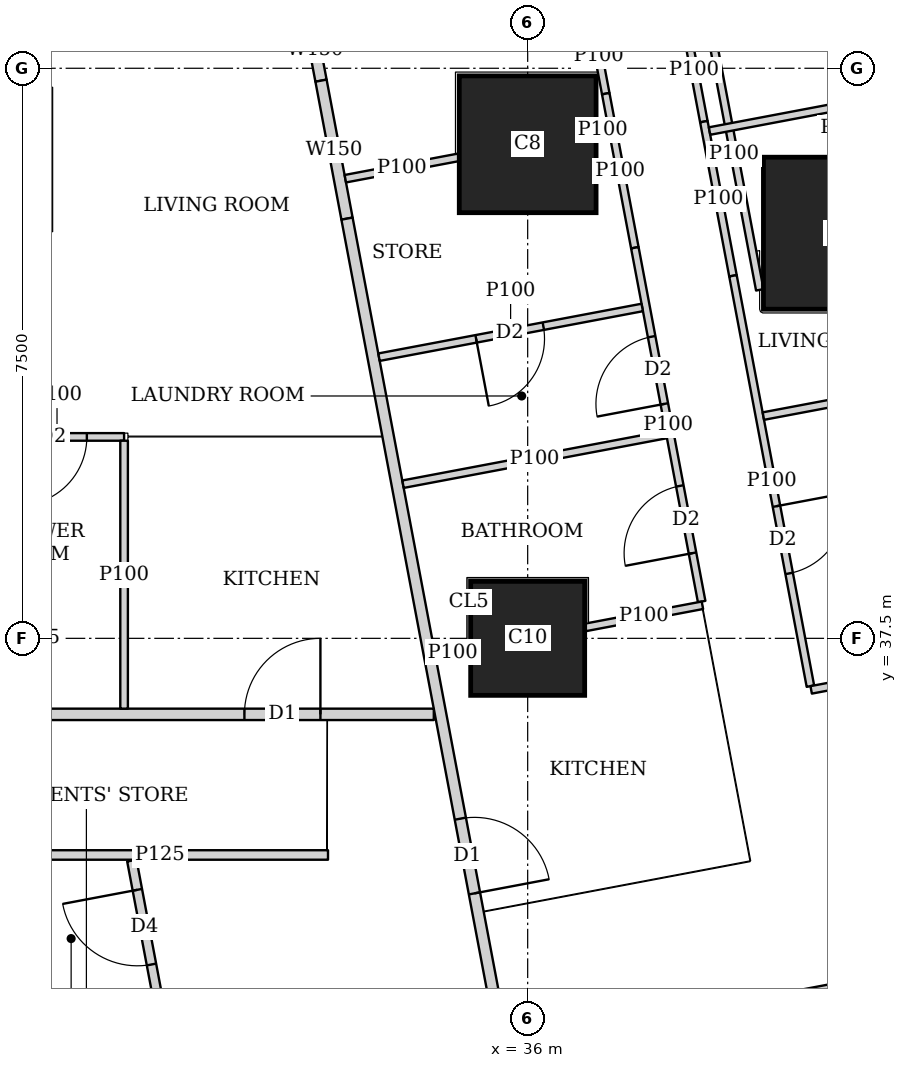
"""IFC4 building model, lengths in metres.
Left out: names, types, materials, properties, quantities, classifications, styles, units other than length and angle.
Written with IfcOpenShell. Run it as: python <this file> out.ifc"""

import sys

from ifc_helpers import new_model, si_unit, direction, frame, frame_2d, origin, origin_2d, place, context, subcontext, project, spatial, rectangle, extrude, element, fill, save


model = new_model("IFC4")
c1 = context("Model", 3, precision=1e-05, world=origin(), true_north=direction((0.0, 1.0)))
c2 = subcontext(c1, "Body", "Model", "MODEL_VIEW")
j1 = project(units=[si_unit("LENGTHUNIT", "METRE"), si_unit("PLANEANGLEUNIT", "RADIAN")], contexts=[c1])
p1 = place(None, origin())
s1 = spatial("IfcSite", under=j1, at=p1, CompositionType="ELEMENT")
p2 = place(p1, origin())
s2 = spatial("IfcBuilding", under=s1, at=p2, CompositionType="ELEMENT")
p3 = place(p2, frame((0.0, 0.0, 184.55)))
s3 = spatial("IfcBuildingStorey", under=s2, at=p3, CompositionType="ELEMENT", Elevation=184.55)
p4 = place(p3, frame((36.0, 37.5, 0.0), z_axis=(0.0, 0.0, 1.0), x_axis=(1.0, 0.0, 0.0)))
e1 = element("IfcColumn", 1, at=p4, inside=s3, PredefinedType="COLUMN", context=c2, shape_type="SweptSolid", body=[
    extrude(rectangle(XDim=1.5, YDim=1.5, at=origin_2d()), origin(), (0.0, 0.0, 1.0), 3.75),
])
p5 = place(p3, frame((40.102, 42.83, 0.0), z_axis=(0.0, 0.0, 1.0), x_axis=(1.0, 0.0, 0.0)))
e2 = element("IfcColumn", 2, at=p5, inside=s3, PredefinedType="COLUMN", context=c2, shape_type="SweptSolid", body=[
    extrude(rectangle(XDim=2.0, YDim=2.0, at=origin_2d()), origin(), (0.0, 0.0, 1.0), 3.75),
])
p6 = place(p3, frame((36.0, 44.0, 0.0), z_axis=(0.0, 0.0, 1.0), x_axis=(1.0, 0.0, 0.0)))
e3 = element("IfcColumn", 3, at=p6, inside=s3, PredefinedType="COLUMN", context=c2, shape_type="SweptSolid", body=[
    extrude(rectangle(XDim=1.8, YDim=1.8, at=origin_2d()), origin(), (0.0, 0.0, 1.0), 3.75),
])
p7 = place(p3, frame((8.35, 36.5, 0.0), z_axis=(0.0, 0.0, 1.0), x_axis=(1.0, 0.0, 0.0)))
e4 = element("IfcWall", 4, at=p7, inside=s3, PredefinedType="SOLIDWALL", context=c2, shape_type="SweptSolid", body=[
    extrude(rectangle(XDim=26.415, YDim=0.15, at=frame_2d((13.208, 0.0))), origin(), (0.0, 0.0, 1.0), 3.45),
])
p8 = place(p7, frame((2.6, 0.0, 0.0)))
e5 = element("IfcOpeningElement", 5, at=p8, cuts=e4, PredefinedType="OPENING", context=c2, shape_type="SweptSolid", body=[
    extrude(rectangle(XDim=1.0, YDim=2.1, at=frame_2d((0.5, 1.05))), frame((0.0, 0.085, 0.0), z_axis=(0.0, -1.0, 0.0), x_axis=(1.0, 0.0, 0.0)), (0.0, 0.0, 1.0), 0.17),
])
p9 = place(p7, frame((14.75, 0.0, 0.0)))
e6 = element("IfcOpeningElement", 6, at=p9, cuts=e4, PredefinedType="OPENING", context=c2, shape_type="SweptSolid", body=[
    extrude(rectangle(XDim=1.0, YDim=2.1, at=frame_2d((0.5, 1.05))), frame((0.0, 0.085, 0.0), z_axis=(0.0, -1.0, 0.0), x_axis=(1.0, 0.0, 0.0)), (0.0, 0.0, 1.0), 0.17),
])
p10 = place(p7, frame((23.923, 0.0, 0.0)))
e7 = element("IfcOpeningElement", 7, at=p10, cuts=e4, PredefinedType="OPENING", context=c2, shape_type="SweptSolid", body=[
    extrude(rectangle(XDim=1.0, YDim=2.1, at=frame_2d((0.5, 1.05))), frame((0.0, 0.085, 0.0), z_axis=(0.0, -1.0, 0.0), x_axis=(1.0, 0.0, 0.0)), (0.0, 0.0, 1.0), 0.17),
])
p11 = place(p3, frame((33.127, 45.65, 0.0), z_axis=(0.0, 0.0, 1.0), x_axis=(0.186176514576, -0.982516313056, 0.0)))
e8 = element("IfcWall", 8, at=p11, inside=s3, PredefinedType="SOLIDWALL", context=c2, shape_type="SweptSolid", body=[
    extrude(rectangle(XDim=0.827, YDim=0.15, at=frame_2d((0.414, 0.0))), origin(), (0.0, 0.0, 1.0), 3.45),
])
p12 = place(p3, frame((33.281, 44.837, 0.0), z_axis=(0.0, 0.0, 1.0), x_axis=(0.185198323004, -0.982701165745, 0.0)))
e9 = element("IfcWall", 9, at=p12, inside=s3, PredefinedType="SOLIDWALL", context=c2, shape_type="SweptSolid", body=[
    extrude(rectangle(XDim=1.847, YDim=0.15, at=frame_2d((0.923, 0.0))), origin(), (0.0, 0.0, 1.0), 2.05),
])
p13 = place(p3, frame((33.623, 43.022, 0.0), z_axis=(0.0, 0.0, 1.0), x_axis=(0.185596841028, -0.98262597798, 0.0)))
e10 = element("IfcWall", 10, at=p13, inside=s3, PredefinedType="SOLIDWALL", context=c2, shape_type="SweptSolid", body=[
    extrude(rectangle(XDim=41.66, YDim=0.15, at=frame_2d((20.83, 0.0))), origin(), (0.0, 0.0, 1.0), 2.45),
])
p14 = place(p13, frame((8.034, 0.0, 0.0)))
e11 = element("IfcOpeningElement", 11, at=p14, cuts=e10, PredefinedType="OPENING", context=c2, shape_type="SweptSolid", body=[
    extrude(rectangle(XDim=1.0, YDim=2.1, at=frame_2d((0.5, 1.05))), frame((0.0, 0.085, 0.0), z_axis=(0.0, -1.0, 0.0), x_axis=(1.0, 0.0, 0.0)), (0.0, 0.0, 1.0), 0.17),
])
p15 = place(p13, frame((12.611, 0.0, 0.0)))
e12 = element("IfcOpeningElement", 12, at=p15, cuts=e10, PredefinedType="OPENING", context=c2, shape_type="SweptSolid", body=[
    extrude(rectangle(XDim=1.0, YDim=2.1, at=frame_2d((0.5, 1.05))), frame((0.0, 0.085, 0.0), z_axis=(0.0, -1.0, 0.0), x_axis=(1.0, 0.0, 0.0)), (0.0, 0.0, 1.0), 0.17),
])
p16 = place(p13, frame((20.242, 0.0, 0.0)))
e13 = element("IfcOpeningElement", 13, at=p16, cuts=e10, PredefinedType="OPENING", context=c2, shape_type="SweptSolid", body=[
    extrude(rectangle(XDim=1.0, YDim=2.1, at=frame_2d((0.5, 1.05))), frame((0.0, 0.085, 0.0), z_axis=(0.0, -1.0, 0.0), x_axis=(1.0, 0.0, 0.0)), (0.0, 0.0, 1.0), 0.17),
])
p17 = place(p13, frame((31.206, 0.0, 0.0)))
e14 = element("IfcOpeningElement", 14, at=p17, cuts=e10, PredefinedType="OPENING", context=c2, shape_type="SweptSolid", body=[
    extrude(rectangle(XDim=1.0, YDim=2.1, at=frame_2d((0.5, 1.05))), frame((0.0, 0.085, 0.0), z_axis=(0.0, -1.0, 0.0), x_axis=(1.0, 0.0, 0.0)), (0.0, 0.0, 1.0), 0.17),
])
p18 = place(p3, frame((39.054, 42.085, 0.0), z_axis=(0.0, 0.0, 1.0), x_axis=(-0.185791584218, 0.982589175207, 0.0)))
e15 = element("IfcWall", 15, at=p18, inside=s3, PredefinedType="PARTITIONING", context=c2, shape_type="SweptSolid", body=[
    extrude(rectangle(XDim=3.628, YDim=0.1, at=frame_2d((1.814, 0.0))), origin(), (0.0, 0.0, 1.0), 2.05),
])
p19 = place(p3, frame((38.063, 45.65, 0.0), z_axis=(0.0, 0.0, 1.0), x_axis=(0.185456359766, -0.982652501458, 0.0)))
e16 = element("IfcWall", 16, at=p19, inside=s3, PredefinedType="PARTITIONING", context=c2, shape_type="SweptSolid", body=[
    extrude(rectangle(XDim=1.376, YDim=0.1, at=frame_2d((0.688, 0.0))), origin(), (0.0, 0.0, 1.0), 3.45),
])
p20 = place(p3, frame((38.318, 44.298, 0.0), z_axis=(0.0, 0.0, 1.0), x_axis=(0.185481135188, -0.982647825261, 0.0)))
e17 = element("IfcWall", 17, at=p20, inside=s3, PredefinedType="PARTITIONING", context=c2, shape_type="SweptSolid", body=[
    extrude(rectangle(XDim=2.064, YDim=0.1, at=frame_2d((1.032, 0.0))), origin(), (0.0, 0.0, 1.0), 2.05),
])
p21 = place(p3, frame((38.701, 42.27, 0.0), z_axis=(0.0, 0.0, 1.0), x_axis=(0.185474244877, -0.982649125826, 0.0)))
e18 = element("IfcWall", 18, at=p21, inside=s3, PredefinedType="PARTITIONING", context=c2, shape_type="SweptSolid", body=[
    extrude(rectangle(XDim=5.494, YDim=0.1, at=frame_2d((2.747, 0.0))), origin(), (0.0, 0.0, 1.0), 3.45),
])
p22 = place(p21, frame((3.085, 0.0, 0.0)))
e19 = element("IfcOpeningElement", 19, at=p22, cuts=e18, PredefinedType="OPENING", context=c2, shape_type="SweptSolid", body=[
    extrude(rectangle(XDim=0.9, YDim=2.1, at=frame_2d((0.45, 1.05))), frame((0.0, 0.06, 0.0), z_axis=(0.0, -1.0, 0.0), x_axis=(1.0, 0.0, 0.0)), (0.0, 0.0, 1.0), 0.12),
])
p23 = place(p3, frame((36.841, 45.65, 0.0), z_axis=(0.0, 0.0, 1.0), x_axis=(0.185789875365, -0.982589498322, 0.0)))
e20 = element("IfcWall", 20, at=p23, inside=s3, PredefinedType="PARTITIONING", context=c2, shape_type="SweptSolid", body=[
    extrude(rectangle(XDim=1.001, YDim=0.1, at=frame_2d((0.5, 0.0))), origin(), (0.0, 0.0, 1.0), 3.45),
])
p24 = place(p3, frame((37.027, 44.666, 0.0), z_axis=(0.0, 0.0, 1.0), x_axis=(0.1855674151, -0.982631535446, 0.0)))
e21 = element("IfcWall", 21, at=p24, inside=s3, PredefinedType="PARTITIONING", context=c2, shape_type="SweptSolid", body=[
    extrude(rectangle(XDim=2.063, YDim=0.1, at=frame_2d((1.031, 0.0))), origin(), (0.0, 0.0, 1.0), 2.05),
])
p25 = place(p3, frame((37.41, 42.639, 0.0), z_axis=(0.0, 0.0, 1.0), x_axis=(0.185579683022, -0.982629218601, 0.0)))
e22 = element("IfcWall", 22, at=p25, inside=s3, PredefinedType="PARTITIONING", context=c2, shape_type="SweptSolid", body=[
    extrude(rectangle(XDim=4.737, YDim=0.1, at=frame_2d((2.369, 0.0))), origin(), (0.0, 0.0, 1.0), 3.45),
])
p26 = place(p25, frame((3.189, 0.0, 0.0)))
e23 = element("IfcOpeningElement", 23, at=p26, cuts=e22, PredefinedType="OPENING", context=c2, shape_type="SweptSolid", body=[
    extrude(rectangle(XDim=0.9, YDim=2.1, at=frame_2d((0.45, 1.05))), frame((0.0, 0.06, 0.0), z_axis=(0.0, -1.0, 0.0), x_axis=(1.0, 0.0, 0.0)), (0.0, 0.0, 1.0), 0.12),
])
p27 = place(p25, frame((1.191, 0.0, 0.0)))
e24 = element("IfcOpeningElement", 24, at=p27, cuts=e22, PredefinedType="OPENING", context=c2, shape_type="SweptSolid", body=[
    extrude(rectangle(XDim=0.9, YDim=2.1, at=frame_2d((0.45, 1.05))), frame((0.0, 0.06, 0.0), z_axis=(0.0, -1.0, 0.0), x_axis=(1.0, 0.0, 0.0)), (0.0, 0.0, 1.0), 0.12),
])
p28 = place(p3, frame((41.968, 44.85, 0.0), z_axis=(0.0, 0.0, 1.0), x_axis=(-0.98258614234, -0.185807623311, 0.0)))
e25 = element("IfcWall", 25, at=p28, inside=s3, PredefinedType="PARTITIONING", context=c2, shape_type="SweptSolid", body=[
    extrude(rectangle(XDim=3.638, YDim=0.1, at=frame_2d((1.819, 0.0))), origin(), (0.0, 0.0, 1.0), 2.05),
])
p29 = place(p3, frame((43.277, 41.212, 0.0), z_axis=(0.0, 0.0, 1.0), x_axis=(-0.982665405803, -0.185387972203, 0.0)))
e26 = element("IfcWall", 26, at=p29, inside=s3, PredefinedType="PARTITIONING", context=c2, shape_type="SweptSolid", body=[
    extrude(rectangle(XDim=4.25, YDim=0.1, at=frame_2d((2.125, 0.0))), origin(), (0.0, 0.0, 1.0), 2.05),
])
p30 = place(p3, frame((41.154, 37.091, 0.0), z_axis=(0.0, 0.0, 1.0), x_axis=(-0.982617614942, -0.185641112921, 0.0)))
e27 = element("IfcWall", 27, at=p30, inside=s3, PredefinedType="PARTITIONING", context=c2, shape_type="SweptSolid", body=[
    extrude(rectangle(XDim=1.449, YDim=0.1, at=frame_2d((0.725, 0.0))), origin(), (0.0, 0.0, 1.0), 3.45),
])
p31 = place(p3, frame((37.064, 44.201, 0.0), z_axis=(0.0, 0.0, 1.0), x_axis=(-0.982960250751, -0.183818240236, 0.0)))
e28 = element("IfcWall", 28, at=p31, inside=s3, PredefinedType="PARTITIONING", context=c2, shape_type="SweptSolid", body=[
    extrude(rectangle(XDim=0.157, YDim=0.1, at=frame_2d((0.078, 0.0))), origin(), (0.0, 0.0, 1.0), 2.05),
])
p32 = place(p3, frame((35.09, 43.828, 0.0), z_axis=(0.0, 0.0, 1.0), x_axis=(-0.982683801717, -0.185290436461, 0.0)))
e29 = element("IfcWall", 29, at=p32, inside=s3, PredefinedType="PARTITIONING", context=c2, shape_type="SweptSolid", body=[
    extrude(rectangle(XDim=1.515, YDim=0.1, at=frame_2d((0.758, 0.0))), origin(), (0.0, 0.0, 1.0), 2.05),
])
p33 = place(p3, frame((37.823, 40.182, 0.0), z_axis=(0.0, 0.0, 1.0), x_axis=(-0.98263926043, -0.185526504472, 0.0)))
e30 = element("IfcWall", 30, at=p33, inside=s3, PredefinedType="PARTITIONING", context=c2, shape_type="SweptSolid", body=[
    extrude(rectangle(XDim=3.524, YDim=0.1, at=frame_2d((1.762, 0.0))), origin(), (0.0, 0.0, 1.0), 3.45),
])
p34 = place(p3, frame((38.299, 37.935, 0.0), z_axis=(0.0, 0.0, 1.0), x_axis=(-0.98258870752, -0.18579405764, 0.0)))
e31 = element("IfcWall", 31, at=p34, inside=s3, PredefinedType="PARTITIONING", context=c2, shape_type="SweptSolid", body=[
    extrude(rectangle(XDim=1.566, YDim=0.1, at=frame_2d((0.783, 0.0))), origin(), (0.0, 0.0, 1.0), 3.45),
])
p35 = place(p3, frame((35.24, 37.357, 0.0), z_axis=(0.0, 0.0, 1.0), x_axis=(-0.982559813104, -0.18594680334, 0.0)))
e32 = element("IfcWall", 32, at=p35, inside=s3, PredefinedType="PARTITIONING", context=c2, shape_type="SweptSolid", body=[
    extrude(rectangle(XDim=0.462, YDim=0.1, at=frame_2d((0.231, 0.0))), origin(), (0.0, 0.0, 1.0), 3.45),
])
p36 = place(p3, frame((37.507, 41.853, 0.0), z_axis=(0.0, 0.0, 1.0), x_axis=(-0.982629014545, -0.18558076348, 0.0)))
e33 = element("IfcWall", 33, at=p36, inside=s3, PredefinedType="PARTITIONING", context=c2, shape_type="SweptSolid", body=[
    extrude(rectangle(XDim=3.524, YDim=0.1, at=frame_2d((1.762, 0.0))), origin(), (0.0, 0.0, 1.0), 3.45),
])
p37 = place(p36, frame((1.324, 0.0, 0.0)))
e34 = element("IfcOpeningElement", 34, at=p37, cuts=e33, PredefinedType="OPENING", context=c2, shape_type="SweptSolid", body=[
    extrude(rectangle(XDim=0.9, YDim=2.1, at=frame_2d((0.45, 1.05))), frame((0.0, 0.06, 0.0), z_axis=(0.0, -1.0, 0.0), x_axis=(1.0, 0.0, 0.0)), (0.0, 0.0, 1.0), 0.12),
])
p38 = place(p3, frame((40.468, 32.915, 0.0), z_axis=(0.0, 0.0, 1.0), x_axis=(-0.982635807605, -0.185544791394, 0.0)))
e35 = element("IfcWall", 35, at=p38, inside=s3, PredefinedType="SOLIDWALL", context=c2, shape_type="SweptSolid", body=[
    extrude(rectangle(XDim=4.775, YDim=0.25, at=frame_2d((2.388, 0.0))), origin(), (0.0, 0.0, 1.0), 3.45),
])
p39 = place(p3, frame((28.925, 40.15, 0.0), z_axis=(0.0, 0.0, 1.0), x_axis=(1.0, 0.0, 0.0)))
e36 = element("IfcWall", 36, at=p39, inside=s3, PredefinedType="PARTITIONING", context=c2, shape_type="SweptSolid", body=[
    extrude(rectangle(XDim=1.765, YDim=0.1, at=frame_2d((0.882, 0.0))), origin(), (0.0, 0.0, 1.0), 3.45),
])
p40 = place(p39, frame((0.375, 0.0, 0.0)))
e37 = element("IfcOpeningElement", 37, at=p40, cuts=e36, PredefinedType="OPENING", context=c2, shape_type="SweptSolid", body=[
    extrude(rectangle(XDim=0.9, YDim=2.1, at=frame_2d((0.45, 1.05))), frame((0.0, 0.06, 0.0), z_axis=(0.0, -1.0, 0.0), x_axis=(1.0, 0.0, 0.0)), (0.0, 0.0, 1.0), 0.12),
])
p41 = place(p3, frame((30.69, 36.575, 0.0), z_axis=(0.0, 0.0, 1.0), x_axis=(0.0, 1.0, 0.0)))
e38 = element("IfcWall", 38, at=p41, inside=s3, PredefinedType="PARTITIONING", context=c2, shape_type="SweptSolid", body=[
    extrude(rectangle(XDim=3.525, YDim=0.1, at=frame_2d((1.763, 0.0))), origin(), (0.0, 0.0, 1.0), 3.45),
])
p42 = place(p3, frame((28.95, 34.65, 0.0), z_axis=(0.0, 0.0, 1.0), x_axis=(1.0, 0.0, 0.0)))
e39 = element("IfcWall", 39, at=p42, inside=s3, PredefinedType="PARTITIONING", context=c2, shape_type="SweptSolid", body=[
    extrude(rectangle(XDim=4.423, YDim=0.125, at=frame_2d((2.211, 0.0))), origin(), (0.0, 0.0, 1.0), 3.45),
])
p43 = place(p3, frame((32.929, 23.263, 0.0), z_axis=(0.0, 0.0, 1.0), x_axis=(-0.185612234763, 0.982623070311, 0.0)))
e40 = element("IfcWall", 40, at=p43, inside=s3, PredefinedType="PARTITIONING", context=c2, shape_type="SweptSolid", body=[
    extrude(rectangle(XDim=11.513, YDim=0.125, at=frame_2d((5.756, 0.0))), origin(), (0.0, 0.0, 1.0), 3.45),
])
p44 = place(p43, frame((0.15, 0.0, 0.0)))
e41 = element("IfcOpeningElement", 41, at=p44, cuts=e40, PredefinedType="OPENING", context=c2, shape_type="SweptSolid", body=[
    extrude(rectangle(XDim=1.0, YDim=2.1, at=frame_2d((0.5, 1.05))), frame((0.0, 0.073, 0.0), z_axis=(0.0, -1.0, 0.0), x_axis=(1.0, 0.0, 0.0)), (0.0, 0.0, 1.0), 0.145),
])
p45 = place(p43, frame((7.679, 0.0, 0.0)))
e42 = element("IfcOpeningElement", 42, at=p45, cuts=e40, PredefinedType="OPENING", context=c2, shape_type="SweptSolid", body=[
    extrude(rectangle(XDim=1.0, YDim=2.1, at=frame_2d((0.5, 1.05))), frame((0.0, 0.073, 0.0), z_axis=(0.0, -1.0, 0.0), x_axis=(1.0, 0.0, 0.0)), (0.0, 0.0, 1.0), 0.145),
])
p46 = place(p43, frame((10.122, 0.0, 0.0)))
e43 = element("IfcOpeningElement", 43, at=p46, cuts=e40, PredefinedType="OPENING", context=c2, shape_type="SweptSolid", body=[
    extrude(rectangle(XDim=1.0, YDim=2.1, at=frame_2d((0.5, 1.05))), frame((0.0, 0.073, 0.0), z_axis=(0.0, -1.0, 0.0), x_axis=(1.0, 0.0, 0.0)), (0.0, 0.0, 1.0), 0.145),
])
p47 = place(p22, origin())
e44 = element("IfcDoor", 44, at=p47, inside=s3, OperationType="SINGLE_SWING_LEFT", PredefinedType="DOOR", context=c2, shape_type="SweptSolid", body=[
    extrude(rectangle(XDim=0.9, YDim=2.1, at=frame_2d((0.45, 1.05))), frame((0.0, 0.025, 0.0), z_axis=(0.0, -1.0, 0.0), x_axis=(1.0, 0.0, 0.0)), (0.0, 0.0, 1.0), 0.05),
])
fill(e19, e44)
p48 = place(p26, origin())
e45 = element("IfcDoor", 45, at=p48, inside=s3, OperationType="SINGLE_SWING_LEFT", PredefinedType="DOOR", context=c2, shape_type="SweptSolid", body=[
    extrude(rectangle(XDim=0.9, YDim=2.1, at=frame_2d((0.45, 1.05))), frame((0.0, 0.025, 0.0), z_axis=(0.0, -1.0, 0.0), x_axis=(1.0, 0.0, 0.0)), (0.0, 0.0, 1.0), 0.05),
])
fill(e23, e45)
p49 = place(p27, origin())
e46 = element("IfcDoor", 46, at=p49, inside=s3, OperationType="SINGLE_SWING_LEFT", PredefinedType="DOOR", context=c2, shape_type="SweptSolid", body=[
    extrude(rectangle(XDim=0.9, YDim=2.1, at=frame_2d((0.45, 1.05))), frame((0.0, 0.025, 0.0), z_axis=(0.0, -1.0, 0.0), x_axis=(1.0, 0.0, 0.0)), (0.0, 0.0, 1.0), 0.05),
])
fill(e24, e46)
p50 = place(p37, origin())
e47 = element("IfcDoor", 47, at=p50, inside=s3, OperationType="SINGLE_SWING_RIGHT", PredefinedType="DOOR", context=c2, shape_type="SweptSolid", body=[
    extrude(rectangle(XDim=0.9, YDim=2.1, at=frame_2d((0.45, 1.05))), frame((0.0, 0.025, 0.0), z_axis=(0.0, -1.0, 0.0), x_axis=(1.0, 0.0, 0.0)), (0.0, 0.0, 1.0), 0.05),
])
fill(e34, e47)
p51 = place(p14, origin())
e48 = element("IfcDoor", 48, at=p51, inside=s3, OperationType="SINGLE_SWING_RIGHT", PredefinedType="DOOR", context=c2, shape_type="SweptSolid", body=[
    extrude(rectangle(XDim=1.0, YDim=2.1, at=frame_2d((0.5, 1.05))), frame((0.0, 0.025, 0.0), z_axis=(0.0, -1.0, 0.0), x_axis=(1.0, 0.0, 0.0)), (0.0, 0.0, 1.0), 0.05),
])
fill(e11, e48)
p52 = place(p40, origin())
e49 = element("IfcDoor", 49, at=p52, inside=s3, OperationType="SINGLE_SWING_RIGHT", PredefinedType="DOOR", context=c2, shape_type="SweptSolid", body=[
    extrude(rectangle(XDim=0.9, YDim=2.1, at=frame_2d((0.45, 1.05))), frame((0.0, 0.025, 0.0), z_axis=(0.0, -1.0, 0.0), x_axis=(1.0, 0.0, 0.0)), (0.0, 0.0, 1.0), 0.05),
])
fill(e37, e49)
p53 = place(p10, origin())
e50 = element("IfcDoor", 50, at=p53, inside=s3, OperationType="SINGLE_SWING_RIGHT", PredefinedType="DOOR", context=c2, shape_type="SweptSolid", body=[
    extrude(rectangle(XDim=1.0, YDim=2.1, at=frame_2d((0.5, 1.05))), frame((0.0, 0.025, 0.0), z_axis=(0.0, -1.0, 0.0), x_axis=(1.0, 0.0, 0.0)), (0.0, 0.0, 1.0), 0.05),
])
fill(e7, e50)
p54 = place(p46, origin())
e51 = element("IfcDoor", 51, at=p54, inside=s3, OperationType="SINGLE_SWING_RIGHT", PredefinedType="DOOR", context=c2, shape_type="SweptSolid", body=[
    extrude(rectangle(XDim=1.0, YDim=2.1, at=frame_2d((0.5, 1.05))), frame((0.0, 0.025, 0.0), z_axis=(0.0, -1.0, 0.0), x_axis=(1.0, 0.0, 0.0)), (0.0, 0.0, 1.0), 0.05),
])
fill(e43, e51)
save(model, sys.argv[1])
